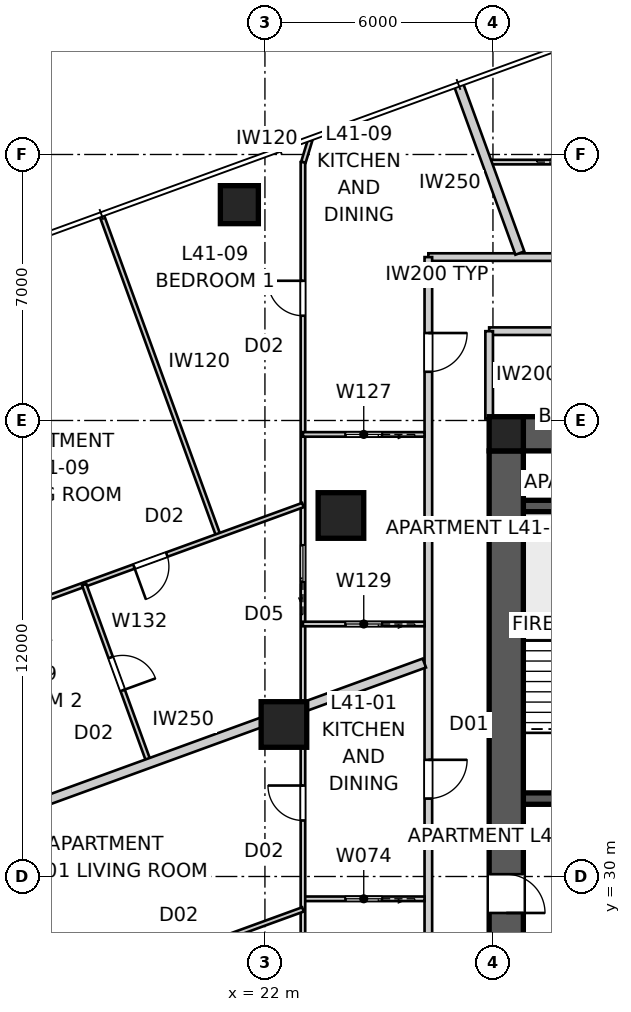
"""IFC4 building model, lengths in metres.
Left out: names, types, materials, properties, quantities, classifications, styles, units other than length and angle.
Written with IfcOpenShell. Run it as: python <this file> out.ifc"""

import sys

from ifc_helpers import new_model, si_unit, direction, frame, frame_2d, origin, origin_2d, place, context, subcontext, project, spatial, polyline, rectangle, outline, extrude, element, fill, save


model = new_model("IFC4")
c1 = context("Model", 3, precision=1e-05, world=origin(), true_north=direction((0.0, 1.0)))
c2 = subcontext(c1, "Body", "Model", "MODEL_VIEW")
j1 = project(units=[si_unit("LENGTHUNIT", "METRE"), si_unit("PLANEANGLEUNIT", "RADIAN")], contexts=[c1])
p1 = place(None, origin())
s1 = spatial("IfcSite", under=j1, at=p1, CompositionType="ELEMENT")
p2 = place(p1, origin())
s2 = spatial("IfcBuilding", under=s1, at=p2, CompositionType="ELEMENT")
p3 = place(p2, frame((0.0, 0.0, 150.6)))
s3 = spatial("IfcBuildingStorey", under=s2, at=p3, CompositionType="ELEMENT", Elevation=150.6)
p4 = place(p3, frame((28.8, 41.65, 0.0), z_axis=(0.0, 0.0, 1.0), x_axis=(1.0, 0.0, 0.0)))
e1 = element("IfcWall", 1, at=p4, inside=s3, PredefinedType="SHEAR", context=c2, shape_type="SweptSolid", body=[
    extrude(outline(polyline([(0.0, -0.45), (22.4, -0.45), (22.4, -0.025), (22.85, -0.025), (22.85, 0.025), (22.4, 0.025), (22.4, 0.45), (0.0, 0.45), (0.0, 0.025), (-0.45, 0.025), (-0.45, -0.025), (0.0, -0.025), (0.0, -0.45)])), origin(), (0.0, 0.0, 1.0), 3.4),
])
p5 = place(p3, frame((28.35, 41.2, 0.0), z_axis=(0.0, 0.0, 1.0), x_axis=(0.0, -1.0, 0.0)))
e2 = element("IfcWall", 2, at=p5, inside=s3, PredefinedType="SHEAR", context=c2, shape_type="SweptSolid", body=[
    extrude(outline(polyline([(0.0, -0.45), (22.4, -0.45), (22.4, -0.025), (22.85, -0.025), (22.85, 0.025), (22.4, 0.025), (22.4, 0.45), (0.0, 0.45), (0.0, 0.025), (-0.45, 0.025), (-0.45, -0.025), (0.0, -0.025), (0.0, -0.45)])), origin(), (0.0, 0.0, 1.0), 3.4),
])
p6 = place(p5, frame((11.14, 0.0, 0.0)))
e3 = element("IfcOpeningElement", 3, at=p6, cuts=e2, PredefinedType="OPENING", context=c2, shape_type="SweptSolid", body=[
    extrude(rectangle(XDim=1.02, YDim=2.4, at=frame_2d((0.51, 1.2))), frame((0.0, 0.46, 0.0), z_axis=(0.0, -1.0, 0.0), x_axis=(1.0, 0.0, 0.0)), (0.0, 0.0, 1.0), 0.92),
])
p7 = place(p3, frame((28.8, 32.05, 0.0), z_axis=(0.0, 0.0, 1.0), x_axis=(1.0, 0.0, 0.0)))
e4 = element("IfcWall", 4, at=p7, inside=s3, PredefinedType="SHEAR", context=c2, shape_type="SweptSolid", body=[
    extrude(rectangle(XDim=22.4, YDim=0.3, at=frame_2d((11.2, 0.0))), origin(), (0.0, 0.0, 1.0), 3.4),
])
p8 = place(p7, frame((19.04, 0.0, 0.0)))
e5 = element("IfcOpeningElement", 5, at=p8, cuts=e4, PredefinedType="OPENING", context=c2, shape_type="SweptSolid", body=[
    extrude(rectangle(XDim=0.92, YDim=2.1, at=frame_2d((0.46, 1.05))), frame((0.0, 0.16, 0.0), z_axis=(0.0, -1.0, 0.0), x_axis=(1.0, 0.0, 0.0)), (0.0, 0.0, 1.0), 0.32),
])
p9 = place(p7, frame((1.265, 0.0, 0.0)))
e6 = element("IfcOpeningElement", 6, at=p9, cuts=e4, PredefinedType="OPENING", context=c2, shape_type="SweptSolid", body=[
    extrude(rectangle(XDim=1.02, YDim=2.1, at=frame_2d((0.51, 1.05))), frame((0.0, 0.16, 0.0), z_axis=(0.0, -1.0, 0.0), x_axis=(1.0, 0.0, 0.0)), (0.0, 0.0, 1.0), 0.32),
])
p10 = place(p7, frame((4.015, 0.0, 0.0)))
e7 = element("IfcOpeningElement", 7, at=p10, cuts=e4, PredefinedType="OPENING", context=c2, shape_type="SweptSolid", body=[
    extrude(rectangle(XDim=0.92, YDim=2.1, at=frame_2d((0.46, 1.05))), frame((0.0, 0.16, 0.0), z_axis=(0.0, -1.0, 0.0), x_axis=(1.0, 0.0, 0.0)), (0.0, 0.0, 1.0), 0.32),
])
p11 = place(p7, frame((7.015, 0.0, 0.0)))
e8 = element("IfcOpeningElement", 8, at=p11, cuts=e4, PredefinedType="OPENING", context=c2, shape_type="SweptSolid", body=[
    extrude(rectangle(XDim=0.92, YDim=2.1, at=frame_2d((0.46, 1.05))), frame((0.0, 0.16, 0.0), z_axis=(0.0, -1.0, 0.0), x_axis=(1.0, 0.0, 0.0)), (0.0, 0.0, 1.0), 0.32),
])
p12 = place(p7, frame((9.34, 0.0, 0.0)))
e9 = element("IfcOpeningElement", 9, at=p12, cuts=e4, PredefinedType="OPENING", context=c2, shape_type="SweptSolid", body=[
    extrude(rectangle(XDim=0.92, YDim=2.1, at=frame_2d((0.46, 1.05))), frame((0.0, 0.16, 0.0), z_axis=(0.0, -1.0, 0.0), x_axis=(1.0, 0.0, 0.0)), (0.0, 0.0, 1.0), 0.32),
])
p13 = place(p7, frame((14.85, 0.0, 0.0)))
e10 = element("IfcOpeningElement", 10, at=p13, cuts=e4, PredefinedType="OPENING", context=c2, shape_type="SweptSolid", body=[
    extrude(rectangle(XDim=1.1, YDim=2.1, at=frame_2d((0.55, 1.05))), frame((0.0, 0.16, 0.0), z_axis=(0.0, -1.0, 0.0), x_axis=(1.0, 0.0, 0.0)), (0.0, 0.0, 1.0), 0.32),
])
p14 = place(p3, frame((28.8, 39.75, 0.0), z_axis=(0.0, 0.0, 1.0), x_axis=(1.0, 0.0, 0.0)))
e11 = element("IfcWall", 11, at=p14, inside=s3, PredefinedType="SHEAR", context=c2, shape_type="SweptSolid", body=[
    extrude(rectangle(XDim=3.5, YDim=0.3, at=frame_2d((1.75, 0.0))), origin(), (0.0, 0.0, 1.0), 3.4),
])
p15 = place(p3, frame((28.35, 41.65, 0.0), z_axis=(0.0, 0.0, 1.0), x_axis=(1.0, 0.0, 0.0)))
e12 = element("IfcColumn", 12, at=p15, inside=s3, PredefinedType="COLUMN", context=c2, shape_type="SweptSolid", body=[
    extrude(rectangle(XDim=0.9, YDim=0.9, at=origin_2d()), origin(), (0.0, 0.0, 1.0), 3.4),
])
p16 = place(p3, frame((21.327, 47.68, 0.0), z_axis=(0.0, 0.0, 1.0), x_axis=(1.0, 0.0, 0.0)))
e13 = element("IfcColumn", 13, at=p16, inside=s3, PredefinedType="COLUMN", context=c2, shape_type="SweptSolid", body=[
    extrude(rectangle(XDim=1.0, YDim=1.0, at=origin_2d()), origin(), (0.0, 0.0, 1.0), 3.4),
])
for number, where, z_axis, x_axis in (
    (14, (24.0, 39.5, 0.0), (0.0, 0.0, 1.0), (1.0, 0.0, 0.0)),
    (15, (22.5, 34.0, 0.0), (0.0, 0.0, 1.0), (1.0, 0.0, 0.0)),
):
    element("IfcColumn", number, at=place(p3, frame(where, z_axis=z_axis, x_axis=x_axis)), inside=s3, PredefinedType="COLUMN", context=c2, shape_type="SweptSolid", body=[
        extrude(rectangle(XDim=1.2, YDim=1.2, at=origin_2d()), origin(), (0.0, 0.0, 1.0), 3.4),
    ])
p17 = place(p3, frame((30.758, 46.3, 0.0), z_axis=(0.0, 0.0, 1.0), x_axis=(-1.0, 0.0, 0.0)))
e16 = element("IfcWall", 16, at=p17, inside=s3, PredefinedType="PARTITIONING", context=c2, shape_type="SweptSolid", body=[
    extrude(rectangle(XDim=4.458, YDim=0.2, at=frame_2d((2.229, 0.0))), origin(), (0.0, 0.0, 1.0), 3.25),
])
p18 = place(p3, frame((26.3, 46.3, 0.0), z_axis=(0.0, 0.0, 1.0), x_axis=(0.0, -1.0, 0.0)))
e17 = element("IfcWall", 17, at=p18, inside=s3, PredefinedType="PARTITIONING", context=c2, shape_type="SweptSolid", body=[
    extrude(rectangle(XDim=33.0, YDim=0.2, at=frame_2d((16.5, 0.0))), origin(), (0.0, 0.0, 1.0), 3.25),
])
p19 = place(p18, frame((13.229, 0.0, 0.0)))
e18 = element("IfcOpeningElement", 18, at=p19, cuts=e17, PredefinedType="OPENING", context=c2, shape_type="SweptSolid", body=[
    extrude(rectangle(XDim=1.02, YDim=2.34, at=frame_2d((0.51, 1.17))), frame((0.0, 0.11, 0.0), z_axis=(0.0, -1.0, 0.0), x_axis=(1.0, 0.0, 0.0)), (0.0, 0.0, 1.0), 0.22),
])
p20 = place(p18, frame((28.51, 0.0, 0.0)))
e19 = element("IfcOpeningElement", 19, at=p20, cuts=e17, PredefinedType="OPENING", context=c2, shape_type="SweptSolid", body=[
    extrude(rectangle(XDim=1.02, YDim=2.34, at=frame_2d((0.51, 1.17))), frame((0.0, 0.11, 0.0), z_axis=(0.0, -1.0, 0.0), x_axis=(1.0, 0.0, 0.0)), (0.0, 0.0, 1.0), 0.22),
])
p21 = place(p18, frame((1.998, 0.0, 0.0)))
e20 = element("IfcOpeningElement", 20, at=p21, cuts=e17, PredefinedType="OPENING", context=c2, shape_type="SweptSolid", body=[
    extrude(rectangle(XDim=1.02, YDim=2.34, at=frame_2d((0.51, 1.17))), frame((0.0, 0.11, 0.0), z_axis=(0.0, -1.0, 0.0), x_axis=(1.0, 0.0, 0.0)), (0.0, 0.0, 1.0), 0.22),
])
p22 = place(p3, frame((14.027, 31.188, 0.0), z_axis=(0.0, 0.0, 1.0), x_axis=(0.939692090592, 0.342021600019, 0.0)))
e21 = element("IfcWall", 21, at=p22, inside=s3, PredefinedType="PARTITIONING", context=c2, shape_type="SweptSolid", body=[
    extrude(rectangle(XDim=12.949, YDim=0.25, at=frame_2d((6.474, 0.0))), origin(), (0.0, 0.0, 1.0), 3.25),
])
p23 = place(p3, frame((27.093, 50.843, 0.0), z_axis=(0.0, 0.0, 1.0), x_axis=(0.342012883883, -0.939695262975, 0.0)))
e22 = element("IfcWall", 22, at=p23, inside=s3, PredefinedType="PARTITIONING", context=c2, shape_type="SweptSolid", body=[
    extrude(rectangle(XDim=4.722, YDim=0.25, at=frame_2d((2.361, 0.0))), origin(), (0.0, 0.0, 1.0), 3.25),
])
p24 = place(p3, frame((52.1, 44.35, 0.0), z_axis=(0.0, 0.0, 1.0), x_axis=(-1.0, 0.0, 0.0)))
e23 = element("IfcWall", 23, at=p24, inside=s3, PredefinedType="PARTITIONING", context=c2, shape_type="SweptSolid", body=[
    extrude(rectangle(XDim=24.2, YDim=0.2, at=frame_2d((12.1, 0.0))), origin(), (0.0, 0.0, 1.0), 3.25),
])
p25 = place(p24, frame((10.743, 0.0, 0.0)))
e24 = element("IfcOpeningElement", 24, at=p25, cuts=e23, PredefinedType="OPENING", context=c2, shape_type="SweptSolid", body=[
    extrude(rectangle(XDim=1.02, YDim=2.1, at=frame_2d((0.51, 1.05))), frame((0.0, 0.11, 0.0), z_axis=(0.0, -1.0, 0.0), x_axis=(1.0, 0.0, 0.0)), (0.0, 0.0, 1.0), 0.22),
])
p26 = place(p24, frame((19.636, 0.0, 0.0)))
e25 = element("IfcOpeningElement", 25, at=p26, cuts=e23, PredefinedType="OPENING", context=c2, shape_type="SweptSolid", body=[
    extrude(rectangle(XDim=1.02, YDim=2.1, at=frame_2d((0.51, 1.05))), frame((0.0, 0.11, 0.0), z_axis=(0.0, -1.0, 0.0), x_axis=(1.0, 0.0, 0.0)), (0.0, 0.0, 1.0), 0.22),
])
p27 = place(p24, frame((3.297, 0.0, 0.0)))
e26 = element("IfcOpeningElement", 26, at=p27, cuts=e23, PredefinedType="OPENING", context=c2, shape_type="SweptSolid", body=[
    extrude(rectangle(XDim=1.02, YDim=2.1, at=frame_2d((0.51, 1.05))), frame((0.0, 0.11, 0.0), z_axis=(0.0, -1.0, 0.0), x_axis=(1.0, 0.0, 0.0)), (0.0, 0.0, 1.0), 0.22),
])
p28 = place(p3, frame((27.9, 44.35, 0.0), z_axis=(0.0, 0.0, 1.0), x_axis=(0.0, -1.0, 0.0)))
e27 = element("IfcWall", 27, at=p28, inside=s3, PredefinedType="PARTITIONING", context=c2, shape_type="SweptSolid", body=[
    extrude(rectangle(XDim=2.3, YDim=0.2, at=frame_2d((1.15, 0.0))), origin(), (0.0, 0.0, 1.0), 3.25),
])
p29 = place(p3, frame((26.2, 29.413, 0.0), z_axis=(0.0, 0.0, 1.0), x_axis=(-1.0, 0.0, 0.0)))
e28 = element("IfcWall", 28, at=p29, inside=s3, PredefinedType="PARTITIONING", context=c2, shape_type="SweptSolid", body=[
    extrude(rectangle(XDim=3.2, YDim=0.12, at=frame_2d((1.6, 0.0))), origin(), (0.0, 0.0, 1.0), 3.25),
])
p30 = place(p29, frame((1.12, 0.0, 0.0)))
e29 = element("IfcOpeningElement", 29, at=p30, cuts=e28, PredefinedType="OPENING", context=c2, shape_type="SweptSolid", body=[
    extrude(rectangle(XDim=0.96, YDim=2.1, at=frame_2d((0.48, 1.05))), frame((0.0, 0.07, 0.0), z_axis=(0.0, -1.0, 0.0), x_axis=(1.0, 0.0, 0.0)), (0.0, 0.0, 1.0), 0.14),
])
p31 = place(p3, frame((23.0, 10.8, 0.0), z_axis=(0.0, 0.0, 1.0), x_axis=(0.0, 1.0, 0.0)))
e30 = element("IfcWall", 30, at=p31, inside=s3, PredefinedType="PARTITIONING", context=c2, shape_type="SweptSolid", body=[
    extrude(rectangle(XDim=38.0, YDim=0.12, at=frame_2d((19.0, 0.0))), origin(), (0.0, 0.0, 1.0), 2.55),
])
p32 = place(p31, frame((20.674, 0.0, 0.0)))
e31 = element("IfcOpeningElement", 31, at=p32, cuts=e30, PredefinedType="OPENING", context=c2, shape_type="SweptSolid", body=[
    extrude(rectangle(XDim=0.92, YDim=2.34, at=frame_2d((0.46, 1.17))), frame((0.0, 0.07, 0.0), z_axis=(0.0, -1.0, 0.0), x_axis=(1.0, 0.0, 0.0)), (0.0, 0.0, 1.0), 0.14),
])
p33 = place(p31, frame((4.598, 0.0, 0.0)))
e32 = element("IfcOpeningElement", 32, at=p33, cuts=e30, PredefinedType="OPENING", context=c2, shape_type="SweptSolid", body=[
    extrude(rectangle(XDim=0.92, YDim=2.34, at=frame_2d((0.46, 1.17))), frame((0.0, 0.07, 0.0), z_axis=(0.0, -1.0, 0.0), x_axis=(1.0, 0.0, 0.0)), (0.0, 0.0, 1.0), 0.14),
])
p34 = place(p31, frame((8.043, 0.0, 0.0)))
e33 = element("IfcOpeningElement", 33, at=p34, cuts=e30, PredefinedType="OPENING", context=c2, shape_type="SweptSolid", body=[
    extrude(rectangle(XDim=0.92, YDim=2.34, at=frame_2d((0.46, 1.17))), frame((0.0, 0.07, 0.0), z_axis=(0.0, -1.0, 0.0), x_axis=(1.0, 0.0, 0.0)), (0.0, 0.0, 1.0), 0.14),
])
p35 = place(p31, frame((33.957, 0.0, 0.0)))
e34 = element("IfcOpeningElement", 34, at=p35, cuts=e30, PredefinedType="OPENING", context=c2, shape_type="SweptSolid", body=[
    extrude(rectangle(XDim=0.92, YDim=2.34, at=frame_2d((0.46, 1.17))), frame((0.0, 0.07, 0.0), z_axis=(0.0, -1.0, 0.0), x_axis=(1.0, 0.0, 0.0)), (0.0, 0.0, 1.0), 0.14),
])
p36 = place(p31, frame((26.957, 0.0, 0.0)))
e35 = element("IfcOpeningElement", 35, at=p36, cuts=e30, PredefinedType="OPENING", context=c2, shape_type="SweptSolid", body=[
    extrude(rectangle(XDim=0.96, YDim=2.1, at=frame_2d((0.48, 1.05))), frame((0.0, 0.07, 0.0), z_axis=(0.0, -1.0, 0.0), x_axis=(1.0, 0.0, 0.0)), (0.0, 0.0, 1.0), 0.14),
])
p37 = place(p3, frame((23.0, 29.134, 0.0), z_axis=(0.0, 0.0, 1.0), x_axis=(-0.939685835373, -0.342038785519, 0.0)))
e36 = element("IfcWall", 36, at=p37, inside=s3, PredefinedType="PARTITIONING", context=c2, shape_type="SweptSolid", body=[
    extrude(rectangle(XDim=7.689, YDim=0.12, at=frame_2d((3.844, 0.0))), origin(), (0.0, 0.0, 1.0), 3.25),
])
p38 = place(p37, frame((3.404, 0.0, 0.0)))
e37 = element("IfcOpeningElement", 37, at=p38, cuts=e36, PredefinedType="OPENING", context=c2, shape_type="SweptSolid", body=[
    extrude(rectangle(XDim=0.92, YDim=2.34, at=frame_2d((0.46, 1.17))), frame((0.0, 0.07, 0.0), z_axis=(0.0, -1.0, 0.0), x_axis=(1.0, 0.0, 0.0)), (0.0, 0.0, 1.0), 0.14),
])
p39 = place(p3, frame((27.836, 48.8, 0.0), z_axis=(0.0, 0.0, 1.0), x_axis=(1.0, 0.0, 0.0)))
e38 = element("IfcWall", 38, at=p39, inside=s3, PredefinedType="PARTITIONING", context=c2, shape_type="SweptSolid", body=[
    extrude(rectangle(XDim=6.964, YDim=0.12, at=frame_2d((3.482, 0.0))), origin(), (0.0, 0.0, 1.0), 3.25),
])
p40 = place(p39, frame((5.659, 0.0, 0.0)))
e39 = element("IfcOpeningElement", 39, at=p40, cuts=e38, PredefinedType="OPENING", context=c2, shape_type="SweptSolid", body=[
    extrude(rectangle(XDim=0.92, YDim=2.34, at=frame_2d((0.46, 1.17))), frame((0.0, 0.07, 0.0), z_axis=(0.0, -1.0, 0.0), x_axis=(1.0, 0.0, 0.0)), (0.0, 0.0, 1.0), 0.14),
])
p41 = place(p39, frame((2.18, 0.0, 0.0)))
e40 = element("IfcOpeningElement", 40, at=p41, cuts=e38, PredefinedType="OPENING", context=c2, shape_type="SweptSolid", body=[
    extrude(rectangle(XDim=0.96, YDim=2.1, at=frame_2d((0.48, 1.05))), frame((0.0, 0.07, 0.0), z_axis=(0.0, -1.0, 0.0), x_axis=(1.0, 0.0, 0.0)), (0.0, 0.0, 1.0), 0.14),
])
p42 = place(p3, frame((26.2, 41.634, 0.0), z_axis=(0.0, 0.0, 1.0), x_axis=(-1.0, 0.0, 0.0)))
e41 = element("IfcWall", 41, at=p42, inside=s3, PredefinedType="PARTITIONING", context=c2, shape_type="SweptSolid", body=[
    extrude(rectangle(XDim=3.2, YDim=0.12, at=frame_2d((1.6, 0.0))), origin(), (0.0, 0.0, 1.0), 3.25),
])
p43 = place(p42, frame((1.12, 0.0, 0.0)))
e42 = element("IfcOpeningElement", 42, at=p43, cuts=e41, PredefinedType="OPENING", context=c2, shape_type="SweptSolid", body=[
    extrude(rectangle(XDim=0.96, YDim=2.1, at=frame_2d((0.48, 1.05))), frame((0.0, 0.07, 0.0), z_axis=(0.0, -1.0, 0.0), x_axis=(1.0, 0.0, 0.0)), (0.0, 0.0, 1.0), 0.14),
])
p44 = place(p3, frame((23.013, 48.8, 0.0), z_axis=(0.0, 0.0, 1.0), x_axis=(0.290455219909, 0.956888585588, 0.0)))
e43 = element("IfcWall", 43, at=p44, inside=s3, PredefinedType="PARTITIONING", context=c2, shape_type="SweptSolid", body=[
    extrude(rectangle(XDim=0.605, YDim=0.12, at=frame_2d((0.303, 0.0))), origin(), (0.0, 0.0, 1.0), 3.25),
])
p45 = place(p3, frame((26.2, 36.645, 0.0), z_axis=(0.0, 0.0, 1.0), x_axis=(-1.0, 0.0, 0.0)))
e44 = element("IfcWall", 44, at=p45, inside=s3, PredefinedType="PARTITIONING", context=c2, shape_type="SweptSolid", body=[
    extrude(rectangle(XDim=3.2, YDim=0.12, at=frame_2d((1.6, 0.0))), origin(), (0.0, 0.0, 1.0), 3.25),
])
p46 = place(p45, frame((1.12, 0.0, 0.0)))
e45 = element("IfcOpeningElement", 45, at=p46, cuts=e44, PredefinedType="OPENING", context=c2, shape_type="SweptSolid", body=[
    extrude(rectangle(XDim=0.96, YDim=2.1, at=frame_2d((0.48, 1.05))), frame((0.0, 0.07, 0.0), z_axis=(0.0, -1.0, 0.0), x_axis=(1.0, 0.0, 0.0)), (0.0, 0.0, 1.0), 0.14),
])
p47 = place(p3, frame((17.71, 47.385, 0.0), z_axis=(0.0, 0.0, 1.0), x_axis=(0.342038393654, -0.939685978009, 0.0)))
e46 = element("IfcWall", 46, at=p47, inside=s3, PredefinedType="PARTITIONING", context=c2, shape_type="SweptSolid", body=[
    extrude(rectangle(XDim=8.96, YDim=0.12, at=frame_2d((4.48, 0.0))), origin(), (0.0, 0.0, 1.0), 3.25),
])
p48 = place(p3, frame((23.0, 39.775, 0.0), z_axis=(0.0, 0.0, 1.0), x_axis=(-0.939693965364, -0.342016449105, 0.0)))
e47 = element("IfcWall", 47, at=p48, inside=s3, PredefinedType="PARTITIONING", context=c2, shape_type="SweptSolid", body=[
    extrude(rectangle(XDim=11.328, YDim=0.12, at=frame_2d((5.664, 0.0))), origin(), (0.0, 0.0, 1.0), 3.25),
])
p49 = place(p48, frame((3.812, 0.0, 0.0)))
e48 = element("IfcOpeningElement", 48, at=p49, cuts=e47, PredefinedType="OPENING", context=c2, shape_type="SweptSolid", body=[
    extrude(rectangle(XDim=0.92, YDim=2.34, at=frame_2d((0.46, 1.17))), frame((0.0, 0.07, 0.0), z_axis=(0.0, -1.0, 0.0), x_axis=(1.0, 0.0, 0.0)), (0.0, 0.0, 1.0), 0.14),
])
p50 = place(p3, frame((17.243, 37.68, 0.0), z_axis=(0.0, 0.0, 1.0), x_axis=(0.341993964619, -0.939702148643, 0.0)))
e49 = element("IfcWall", 49, at=p50, inside=s3, PredefinedType="PARTITIONING", context=c2, shape_type="SweptSolid", body=[
    extrude(rectangle(XDim=5.0, YDim=0.12, at=frame_2d((2.5, 0.0))), origin(), (0.0, 0.0, 1.0), 3.25),
])
p51 = place(p50, frame((2.04, 0.0, 0.0)))
e50 = element("IfcOpeningElement", 50, at=p51, cuts=e49, PredefinedType="OPENING", context=c2, shape_type="SweptSolid", body=[
    extrude(rectangle(XDim=0.92, YDim=2.34, at=frame_2d((0.46, 1.17))), frame((0.0, 0.07, 0.0), z_axis=(0.0, -1.0, 0.0), x_axis=(1.0, 0.0, 0.0)), (0.0, 0.0, 1.0), 0.14),
])
p52 = place(p19, origin())
e51 = element("IfcDoor", 51, at=p52, inside=s3, OperationType="SINGLE_SWING_LEFT", PredefinedType="DOOR", context=c2, shape_type="SweptSolid", body=[
    extrude(rectangle(XDim=1.02, YDim=2.34, at=frame_2d((0.51, 1.17))), frame((0.0, 0.025, 0.0), z_axis=(0.0, -1.0, 0.0), x_axis=(1.0, 0.0, 0.0)), (0.0, 0.0, 1.0), 0.05),
])
fill(e18, e51)
p53 = place(p21, origin())
e52 = element("IfcDoor", 52, at=p53, inside=s3, OperationType="SINGLE_SWING_LEFT", PredefinedType="DOOR", context=c2, shape_type="SweptSolid", body=[
    extrude(rectangle(XDim=1.02, YDim=2.34, at=frame_2d((0.51, 1.17))), frame((0.0, 0.025, 0.0), z_axis=(0.0, -1.0, 0.0), x_axis=(1.0, 0.0, 0.0)), (0.0, 0.0, 1.0), 0.05),
])
fill(e20, e52)
p54 = place(p32, origin())
e53 = element("IfcDoor", 53, at=p54, inside=s3, OperationType="SINGLE_SWING_RIGHT", PredefinedType="DOOR", context=c2, shape_type="SweptSolid", body=[
    extrude(rectangle(XDim=0.92, YDim=2.34, at=frame_2d((0.46, 1.17))), frame((0.0, 0.025, 0.0), z_axis=(0.0, -1.0, 0.0), x_axis=(1.0, 0.0, 0.0)), (0.0, 0.0, 1.0), 0.05),
])
fill(e31, e53)
p55 = place(p30, origin())
e54 = element("IfcDoor", 54, at=p55, inside=s3, OperationType="SLIDING_TO_LEFT", PredefinedType="DOOR", context=c2, shape_type="SweptSolid", body=[
    extrude(rectangle(XDim=0.96, YDim=2.1, at=frame_2d((0.48, 1.05))), frame((0.0, 0.025, 0.0), z_axis=(0.0, -1.0, 0.0), x_axis=(1.0, 0.0, 0.0)), (0.0, 0.0, 1.0), 0.05),
])
fill(e29, e54)
p56 = place(p35, origin())
e55 = element("IfcDoor", 55, at=p56, inside=s3, OperationType="SINGLE_SWING_RIGHT", PredefinedType="DOOR", context=c2, shape_type="SweptSolid", body=[
    extrude(rectangle(XDim=0.92, YDim=2.34, at=frame_2d((0.46, 1.17))), frame((0.0, 0.025, 0.0), z_axis=(0.0, -1.0, 0.0), x_axis=(1.0, 0.0, 0.0)), (0.0, 0.0, 1.0), 0.05),
])
fill(e34, e55)
p57 = place(p43, origin())
e56 = element("IfcDoor", 56, at=p57, inside=s3, OperationType="SLIDING_TO_LEFT", PredefinedType="DOOR", context=c2, shape_type="SweptSolid", body=[
    extrude(rectangle(XDim=0.96, YDim=2.1, at=frame_2d((0.48, 1.05))), frame((0.0, 0.025, 0.0), z_axis=(0.0, -1.0, 0.0), x_axis=(1.0, 0.0, 0.0)), (0.0, 0.0, 1.0), 0.05),
])
fill(e42, e56)
p58 = place(p46, origin())
e57 = element("IfcDoor", 57, at=p58, inside=s3, OperationType="SLIDING_TO_LEFT", PredefinedType="DOOR", context=c2, shape_type="SweptSolid", body=[
    extrude(rectangle(XDim=0.96, YDim=2.1, at=frame_2d((0.48, 1.05))), frame((0.0, 0.025, 0.0), z_axis=(0.0, -1.0, 0.0), x_axis=(1.0, 0.0, 0.0)), (0.0, 0.0, 1.0), 0.05),
])
fill(e45, e57)
p59 = place(p36, origin())
e58 = element("IfcDoor", 58, at=p59, inside=s3, OperationType="SLIDING_TO_LEFT", PredefinedType="DOOR", context=c2, shape_type="SweptSolid", body=[
    extrude(rectangle(XDim=0.96, YDim=2.1, at=frame_2d((0.48, 1.05))), frame((0.0, 0.025, 0.0), z_axis=(0.0, -1.0, 0.0), x_axis=(1.0, 0.0, 0.0)), (0.0, 0.0, 1.0), 0.05),
])
fill(e35, e58)
p60 = place(p51, origin())
e59 = element("IfcDoor", 59, at=p60, inside=s3, OperationType="SINGLE_SWING_RIGHT", PredefinedType="DOOR", context=c2, shape_type="SweptSolid", body=[
    extrude(rectangle(XDim=0.92, YDim=2.34, at=frame_2d((0.46, 1.17))), frame((0.0, 0.025, 0.0), z_axis=(0.0, -1.0, 0.0), x_axis=(1.0, 0.0, 0.0)), (0.0, 0.0, 1.0), 0.05),
])
fill(e50, e59)
p61 = place(p49, origin())
e60 = element("IfcDoor", 60, at=p61, inside=s3, OperationType="SINGLE_SWING_RIGHT", PredefinedType="DOOR", context=c2, shape_type="SweptSolid", body=[
    extrude(rectangle(XDim=0.92, YDim=2.34, at=frame_2d((0.46, 1.17))), frame((0.0, 0.025, 0.0), z_axis=(0.0, -1.0, 0.0), x_axis=(1.0, 0.0, 0.0)), (0.0, 0.0, 1.0), 0.05),
])
fill(e48, e60)
p62 = place(p6, origin())
e61 = element("IfcDoor", 61, at=p62, inside=s3, OperationType="SINGLE_SWING_RIGHT", PredefinedType="DOOR", context=c2, shape_type="SweptSolid", body=[
    extrude(rectangle(XDim=1.02, YDim=2.4, at=frame_2d((0.51, 1.2))), frame((0.0, 0.025, 0.0), z_axis=(0.0, -1.0, 0.0), x_axis=(1.0, 0.0, 0.0)), (0.0, 0.0, 1.0), 0.05),
])
fill(e3, e61)
save(model, sys.argv[1])
